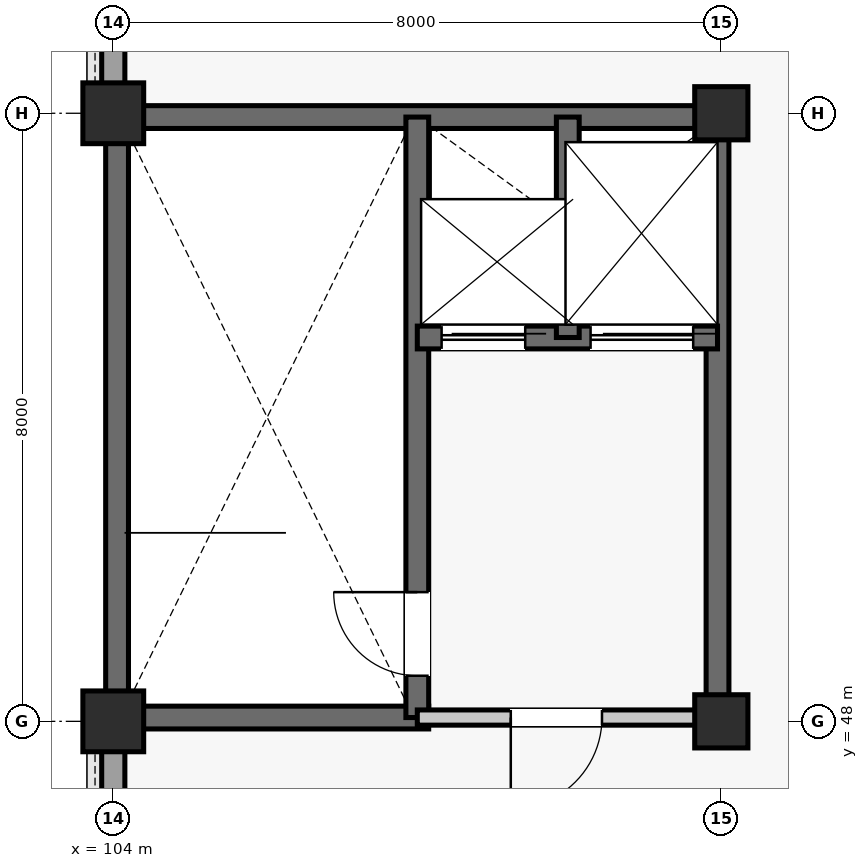
"""IFC4 building model, lengths in metres.
Left out: names, types, materials, properties, quantities, classifications, styles, units other than length and angle.
Written with IfcOpenShell. Run it as: python <this file> out.ifc"""

import sys

from ifc_helpers import new_model, si_unit, direction, frame, frame_2d, origin, origin_2d, place, context, subcontext, project, spatial, rectangle, extrude, element, fill, save


model = new_model("IFC4")
c1 = context("Model", 3, precision=1e-05, world=origin(), true_north=direction((0.0, 1.0)))
c2 = subcontext(c1, "Body", "Model", "MODEL_VIEW")
j1 = project(units=[si_unit("LENGTHUNIT", "METRE"), si_unit("PLANEANGLEUNIT", "RADIAN")], contexts=[c1])
p1 = place(None, origin())
s1 = spatial("IfcSite", under=j1, at=p1, CompositionType="ELEMENT")
p2 = place(p1, origin())
s2 = spatial("IfcBuilding", under=s1, at=p2, CompositionType="ELEMENT")
p3 = place(p2, frame((0.0, 0.0, 17.82)))
s3 = spatial("IfcBuildingStorey", under=s2, at=p3, CompositionType="ELEMENT", Elevation=17.82)
for number, where, z_axis, x_axis in (
    (1, (104.0, 48.0, 0.0), (0.0, 0.0, 1.0), (1.0, 0.0, 0.0)),
    (2, (104.0, 56.0, 0.0), (0.0, 0.0, 1.0), (1.0, 0.0, 0.0)),
):
    element("IfcColumn", number, at=place(p3, frame(where, z_axis=z_axis, x_axis=x_axis)), inside=s3, PredefinedType="COLUMN", context=c2, shape_type="SweptSolid", body=[
        extrude(rectangle(XDim=0.8, YDim=0.8, at=origin_2d()), origin(), (0.0, 0.0, 1.0), 3.96),
    ])
for number, where, z_axis, x_axis in (
    (3, (112.0, 48.0, 0.0), (0.0, 0.0, 1.0), (1.0, 0.0, 0.0)),
    (4, (112.0, 56.0, 0.0), (0.0, 0.0, 1.0), (1.0, 0.0, 0.0)),
):
    element("IfcColumn", number, at=place(p3, frame(where, z_axis=z_axis, x_axis=x_axis)), inside=s3, PredefinedType="COLUMN", context=c2, shape_type="SweptSolid", body=[
        extrude(rectangle(XDim=0.7, YDim=0.7, at=origin_2d()), origin(), (0.0, 0.0, 1.0), 3.96),
    ])
p4 = place(p3, frame((104.0, 40.385, 0.0), z_axis=(0.0, 0.0, 1.0), x_axis=(0.0, 1.0, 0.0)))
e5 = element("IfcWall", 5, at=p4, inside=s3, PredefinedType="SOLIDWALL", context=c2, shape_type="SweptSolid", body=[
    extrude(rectangle(XDim=7.23, YDim=0.305, at=frame_2d((3.615, 0.0))), origin(), (0.0, 0.0, 1.0), 3.002),
])
p5 = place(p4, frame((2.79, 0.0, 0.9)))
e6 = element("IfcOpeningElement", 6, at=p5, cuts=e5, PredefinedType="OPENING", context=c2, shape_type="SweptSolid", body=[
    extrude(rectangle(XDim=1.65, YDim=1.75, at=frame_2d((0.825, 0.875))), frame((0.0, 0.162, 0.0), z_axis=(0.0, -1.0, 0.0), x_axis=(1.0, 0.0, 0.0)), (0.0, 0.0, 1.0), 0.325),
])
p6 = place(p3, frame((104.0, 56.385, 0.0), z_axis=(0.0, 0.0, 1.0), x_axis=(0.0, 1.0, 0.0)))
e7 = element("IfcWall", 7, at=p6, inside=s3, PredefinedType="SOLIDWALL", context=c2, shape_type="SweptSolid", body=[
    extrude(rectangle(XDim=7.23, YDim=0.305, at=frame_2d((3.615, 0.0))), origin(), (0.0, 0.0, 1.0), 3.002),
])
p7 = place(p6, frame((0.701, 0.0, 0.95)))
e8 = element("IfcOpeningElement", 8, at=p7, cuts=e7, PredefinedType="OPENING", context=c2, shape_type="SweptSolid", body=[
    extrude(rectangle(XDim=1.2, YDim=1.8, at=frame_2d((0.6, 0.9))), frame((0.0, 0.162, 0.0), z_axis=(0.0, -1.0, 0.0), x_axis=(1.0, 0.0, 0.0)), (0.0, 0.0, 1.0), 0.325),
])
p8 = place(p6, frame((5.329, 0.0, 0.95)))
e9 = element("IfcOpeningElement", 9, at=p8, cuts=e7, PredefinedType="OPENING", context=c2, shape_type="SweptSolid", body=[
    extrude(rectangle(XDim=1.2, YDim=1.8, at=frame_2d((0.6, 0.9))), frame((0.0, 0.162, 0.0), z_axis=(0.0, -1.0, 0.0), x_axis=(1.0, 0.0, 0.0)), (0.0, 0.0, 1.0), 0.325),
])
p9 = place(p3, frame((104.05, 48.29, 0.0), z_axis=(0.0, 0.0, 1.0), x_axis=(0.0, 1.0, 0.0)))
e10 = element("IfcWall", 10, at=p9, inside=s3, PredefinedType="SHEAR", context=c2, shape_type="SweptSolid", body=[
    extrude(rectangle(XDim=7.42, YDim=0.3, at=frame_2d((3.71, 0.0))), origin(), (0.0, 0.0, 1.0), 2.995),
])
p10 = place(p3, frame((104.29, 55.95, 0.0), z_axis=(0.0, 0.0, 1.0), x_axis=(1.0, 0.0, 0.0)))
e11 = element("IfcWall", 11, at=p10, inside=s3, PredefinedType="SHEAR", context=c2, shape_type="SweptSolid", body=[
    extrude(rectangle(XDim=7.47, YDim=0.3, at=frame_2d((3.735, 0.0))), origin(), (0.0, 0.0, 1.0), 3.232),
])
p11 = place(p3, frame((111.95, 48.24, 0.0), z_axis=(0.0, 0.0, 1.0), x_axis=(0.0, 1.0, 0.0)))
e12 = element("IfcWall", 12, at=p11, inside=s3, PredefinedType="SHEAR", context=c2, shape_type="SweptSolid", body=[
    extrude(rectangle(XDim=7.52, YDim=0.3, at=frame_2d((3.76, 0.0))), origin(), (0.0, 0.0, 1.0), 3.437),
])
p12 = place(p3, frame((104.29, 48.05, 0.0), z_axis=(0.0, 0.0, 1.0), x_axis=(1.0, 0.0, 0.0)))
e13 = element("IfcWall", 13, at=p12, inside=s3, PredefinedType="SHEAR", context=c2, shape_type="SweptSolid", body=[
    extrude(rectangle(XDim=3.86, YDim=0.3, at=frame_2d((1.93, 0.0))), origin(), (0.0, 0.0, 1.0), 3.437),
])
p13 = place(p3, frame((108.0, 48.05, 0.0), z_axis=(0.0, 0.0, 1.0), x_axis=(0.0, 1.0, 0.0)))
e14 = element("IfcWall", 14, at=p13, inside=s3, PredefinedType="SHEAR", context=c2, shape_type="SweptSolid", body=[
    extrude(rectangle(XDim=7.9, YDim=0.3, at=frame_2d((3.95, 0.0))), origin(), (0.0, 0.0, 1.0), 3.232),
])
p14 = place(p13, frame((0.55, 0.0, 0.0)))
e15 = element("IfcOpeningElement", 15, at=p14, cuts=e14, PredefinedType="OPENING", context=c2, shape_type="SweptSolid", body=[
    extrude(rectangle(XDim=1.1, YDim=2.15, at=frame_2d((0.55, 1.075))), frame((0.0, 0.16, 0.0), z_axis=(0.0, -1.0, 0.0), x_axis=(1.0, 0.0, 0.0)), (0.0, 0.0, 1.0), 0.32),
])
p15 = place(p3, frame((108.0, 53.05, 0.0), z_axis=(0.0, 0.0, 1.0), x_axis=(1.0, 0.0, 0.0)))
e16 = element("IfcWall", 16, at=p15, inside=s3, PredefinedType="SHEAR", context=c2, shape_type="SweptSolid", body=[
    extrude(rectangle(XDim=3.95, YDim=0.3, at=frame_2d((1.975, 0.0))), origin(), (0.0, 0.0, 1.0), 3.735),
])
p16 = place(p15, frame((0.32, 0.0, 0.0)))
e17 = element("IfcOpeningElement", 17, at=p16, cuts=e16, PredefinedType="OPENING", context=c2, shape_type="SweptSolid", body=[
    extrude(rectangle(XDim=1.1, YDim=2.2, at=frame_2d((0.55, 1.1))), frame((0.0, 0.16, 0.0), z_axis=(0.0, -1.0, 0.0), x_axis=(1.0, 0.0, 0.0)), (0.0, 0.0, 1.0), 0.32),
])
p17 = place(p15, frame((2.28, 0.0, 0.0)))
e18 = element("IfcOpeningElement", 18, at=p17, cuts=e16, PredefinedType="OPENING", context=c2, shape_type="SweptSolid", body=[
    extrude(rectangle(XDim=1.35, YDim=2.3, at=frame_2d((0.675, 1.15))), frame((0.0, 0.16, 0.0), z_axis=(0.0, -1.0, 0.0), x_axis=(1.0, 0.0, 0.0)), (0.0, 0.0, 1.0), 0.32),
])
p18 = place(p3, frame((109.98, 53.05, 0.0), z_axis=(0.0, 0.0, 1.0), x_axis=(0.0, 1.0, 0.0)))
e19 = element("IfcWall", 19, at=p18, inside=s3, PredefinedType="SHEAR", context=c2, shape_type="SweptSolid", body=[
    extrude(rectangle(XDim=2.9, YDim=0.3, at=frame_2d((1.45, 0.0))), origin(), (0.0, 0.0, 1.0), 3.232),
])
p19 = place(p3, frame((108.0, 48.05, 0.0), z_axis=(0.0, 0.0, 1.0), x_axis=(1.0, 0.0, 0.0)))
e20 = element("IfcWall", 20, at=p19, inside=s3, PredefinedType="PARTITIONING", context=c2, shape_type="SweptSolid", body=[
    extrude(rectangle(XDim=3.66, YDim=0.2, at=frame_2d((1.83, 0.0))), origin(), (0.0, 0.0, 1.0), 3.437),
])
p20 = place(p19, frame((1.23, 0.0, 0.0)))
e21 = element("IfcOpeningElement", 21, at=p20, cuts=e20, PredefinedType="OPENING", context=c2, shape_type="SweptSolid", body=[
    extrude(rectangle(XDim=1.2, YDim=2.15, at=frame_2d((0.6, 1.075))), frame((0.0, 0.11, 0.0), z_axis=(0.0, -1.0, 0.0), x_axis=(1.0, 0.0, 0.0)), (0.0, 0.0, 1.0), 0.22),
])
p21 = place(p14, origin())
e22 = element("IfcDoor", 22, at=p21, inside=s3, OperationType="SINGLE_SWING_RIGHT", PredefinedType="DOOR", context=c2, shape_type="SweptSolid", body=[
    extrude(rectangle(XDim=1.1, YDim=2.15, at=frame_2d((0.55, 1.075))), frame((0.0, 0.025, 0.0), z_axis=(0.0, -1.0, 0.0), x_axis=(1.0, 0.0, 0.0)), (0.0, 0.0, 1.0), 0.05),
])
fill(e15, e22)
p22 = place(p16, origin())
e23 = element("IfcDoor", 23, at=p22, inside=s3, OperationType="SLIDING_TO_LEFT", PredefinedType="DOOR", context=c2, shape_type="SweptSolid", body=[
    extrude(rectangle(XDim=1.1, YDim=2.2, at=frame_2d((0.55, 1.1))), frame((0.0, 0.025, 0.0), z_axis=(0.0, -1.0, 0.0), x_axis=(1.0, 0.0, 0.0)), (0.0, 0.0, 1.0), 0.05),
])
fill(e17, e23)
p23 = place(p17, origin())
e24 = element("IfcDoor", 24, at=p23, inside=s3, OperationType="DOUBLE_DOOR_SLIDING", PredefinedType="DOOR", context=c2, shape_type="SweptSolid", body=[
    extrude(rectangle(XDim=1.35, YDim=2.3, at=frame_2d((0.675, 1.15))), frame((0.0, 0.025, 0.0), z_axis=(0.0, -1.0, 0.0), x_axis=(1.0, 0.0, 0.0)), (0.0, 0.0, 1.0), 0.05),
])
fill(e18, e24)
p24 = place(p20, frame((1.2, 0.0, 0.0), z_axis=(0.0, 0.0, 1.0), x_axis=(-1.0, 0.0, 0.0)))
e25 = element("IfcDoor", 25, at=p24, inside=s3, OperationType="SINGLE_SWING_LEFT", PredefinedType="DOOR", context=c2, shape_type="SweptSolid", body=[
    extrude(rectangle(XDim=1.2, YDim=2.15, at=frame_2d((0.6, 1.075))), frame((0.0, 0.025, 0.0), z_axis=(0.0, -1.0, 0.0), x_axis=(1.0, 0.0, 0.0)), (0.0, 0.0, 1.0), 0.05),
])
fill(e21, e25)
save(model, sys.argv[1])
